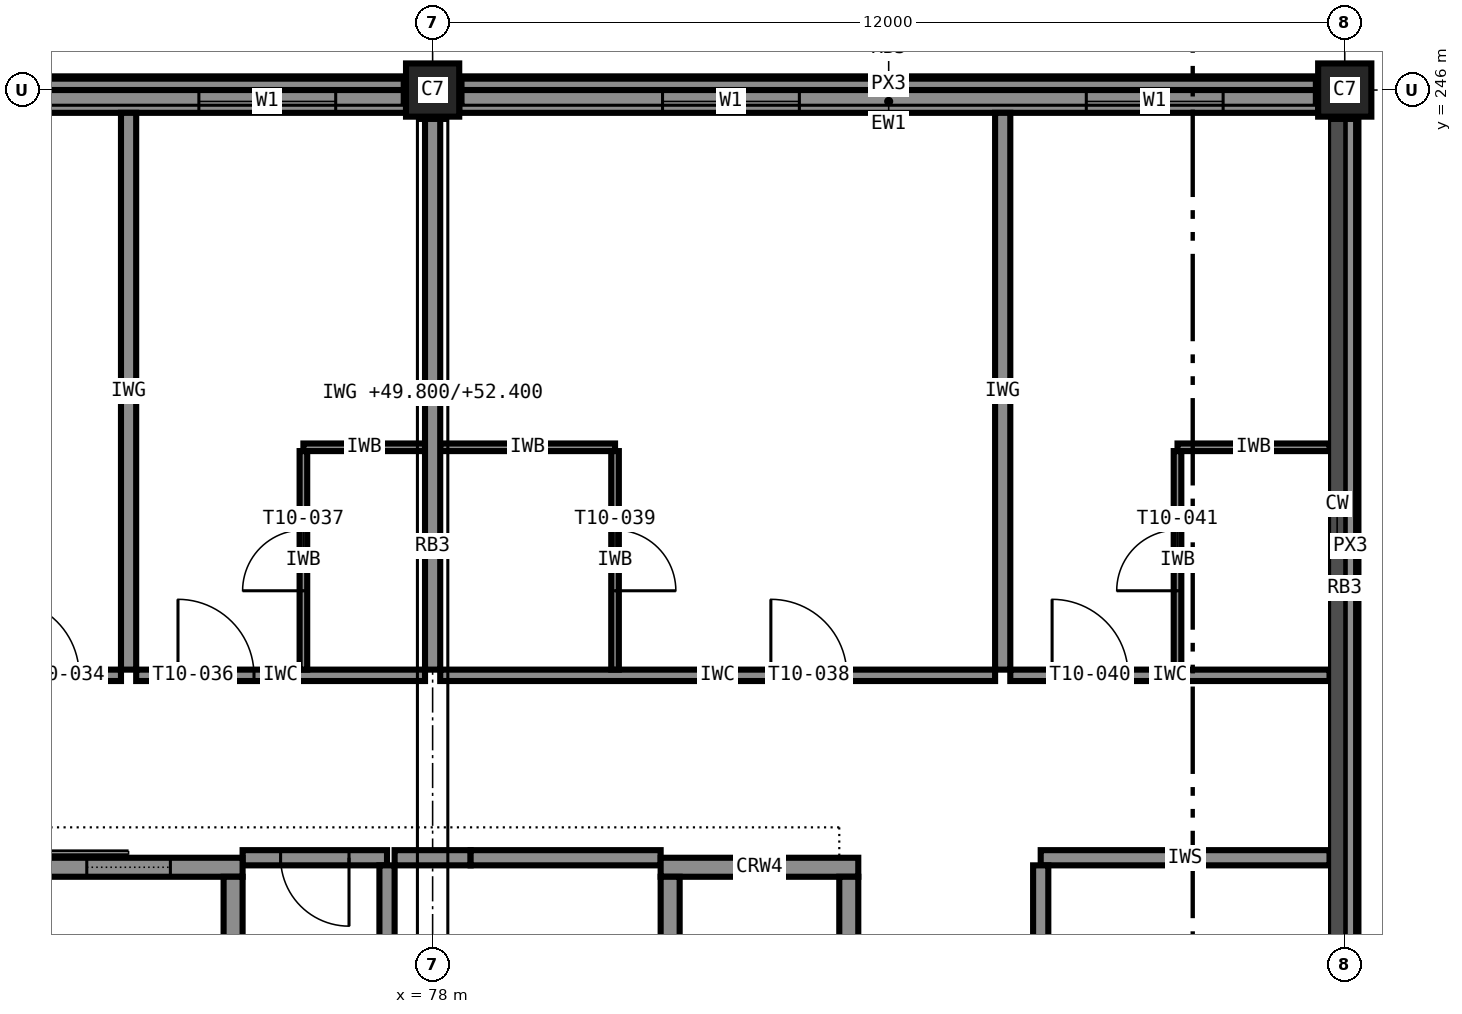
"""IFC4 building model, lengths in metres.
Left out: names, types, materials, properties, quantities, classifications, styles, units other than length and angle.
Written with IfcOpenShell. Run it as: python <this file> out.ifc"""

import sys

from ifc_helpers import new_model, si_unit, direction, frame, frame_2d, origin, origin_2d, place, context, subcontext, project, spatial, rectangle, extrude, element, fill, save


model = new_model("IFC4")
c1 = context("Model", 3, precision=1e-05, world=origin(), true_north=direction((0.0, 1.0)))
c2 = subcontext(c1, "Body", "Model", "MODEL_VIEW")
j1 = project(units=[si_unit("LENGTHUNIT", "METRE"), si_unit("PLANEANGLEUNIT", "RADIAN")], contexts=[c1])
p1 = place(None, origin())
s1 = spatial("IfcSite", under=j1, at=p1, CompositionType="ELEMENT")
p2 = place(p1, origin())
s2 = spatial("IfcBuilding", under=s1, at=p2, CompositionType="ELEMENT")
p3 = place(p2, frame((0.0, 0.0, 49.8)))
s3 = spatial("IfcBuildingStorey", under=s2, at=p3, CompositionType="ELEMENT", Elevation=49.8)
for number, where, z_axis, x_axis in (
    (1, (78.0, 246.0, 0.0), (0.0, 0.0, 1.0), (1.0, 0.0, 0.0)),
    (2, (90.0, 246.0, 0.0), (0.0, 0.0, 1.0), (1.0, 0.0, 0.0)),
):
    element("IfcColumn", number, at=place(p3, frame(where, z_axis=z_axis, x_axis=x_axis)), inside=s3, PredefinedType="COLUMN", context=c2, shape_type="SweptSolid", body=[
        extrude(rectangle(XDim=0.7, YDim=0.7, at=origin_2d()), origin(), (0.0, 0.0, 1.0), 3.6),
    ])
p4 = place(p3, frame((72.5, 235.775, 0.0), z_axis=(0.0, 0.0, 1.0), x_axis=(1.0, 0.0, 0.0)))
e3 = element("IfcWall", 3, at=p4, inside=s3, PredefinedType="SHEAR", context=c2, shape_type="SweptSolid", body=[
    extrude(rectangle(XDim=3.0, YDim=0.25, at=frame_2d((1.5, 0.0))), origin(), (0.0, 0.0, 1.0), 3.6),
])
p5 = place(p4, frame((0.95, 0.0, 0.0)))
e4 = element("IfcOpeningElement", 4, at=p5, cuts=e3, PredefinedType="OPENING", context=c2, shape_type="SweptSolid", body=[
    extrude(rectangle(XDim=1.1, YDim=2.1, at=frame_2d((0.55, 1.05))), frame((0.0, 0.135, 0.0), z_axis=(0.0, -1.0, 0.0), x_axis=(1.0, 0.0, 0.0)), (0.0, 0.0, 1.0), 0.27),
])
p6 = place(p3, frame((75.375, 232.35, 0.0), z_axis=(0.0, 0.0, 1.0), x_axis=(0.0, 1.0, 0.0)))
e5 = element("IfcWall", 5, at=p6, inside=s3, PredefinedType="SHEAR", context=c2, shape_type="SweptSolid", body=[
    extrude(rectangle(XDim=3.3, YDim=0.25, at=frame_2d((1.65, 0.0))), origin(), (0.0, 0.0, 1.0), 3.6),
])
p7 = place(p3, frame((81.0, 235.775, 0.0), z_axis=(0.0, 0.0, 1.0), x_axis=(1.0, 0.0, 0.0)))
e6 = element("IfcWall", 6, at=p7, inside=s3, PredefinedType="SHEAR", context=c2, shape_type="SweptSolid", body=[
    extrude(rectangle(XDim=2.6, YDim=0.25, at=frame_2d((1.3, 0.0))), origin(), (0.0, 0.0, 1.0), 3.6),
])
p8 = place(p3, frame((81.125, 232.35, 0.0), z_axis=(0.0, 0.0, 1.0), x_axis=(0.0, 1.0, 0.0)))
e7 = element("IfcWall", 7, at=p8, inside=s3, PredefinedType="SHEAR", context=c2, shape_type="SweptSolid", body=[
    extrude(rectangle(XDim=3.3, YDim=0.25, at=frame_2d((1.65, 0.0))), origin(), (0.0, 0.0, 1.0), 3.6),
])
p9 = place(p8, frame((1.1, 0.0, 0.0)))
e8 = element("IfcOpeningElement", 8, at=p9, cuts=e7, PredefinedType="OPENING", context=c2, shape_type="SweptSolid", body=[
    extrude(rectangle(XDim=1.1, YDim=2.1, at=frame_2d((0.55, 1.05))), frame((0.0, 0.135, 0.0), z_axis=(0.0, -1.0, 0.0), x_axis=(1.0, 0.0, 0.0)), (0.0, 0.0, 1.0), 0.27),
])
p10 = place(p3, frame((83.475, 232.35, 0.0), z_axis=(0.0, 0.0, 1.0), x_axis=(0.0, 1.0, 0.0)))
e9 = element("IfcWall", 9, at=p10, inside=s3, PredefinedType="SHEAR", context=c2, shape_type="SweptSolid", body=[
    extrude(rectangle(XDim=3.3, YDim=0.25, at=frame_2d((1.65, 0.0))), origin(), (0.0, 0.0, 1.0), 3.6),
])
p11 = place(p3, frame((90.075, 234.35, 3.4), z_axis=(0.0, 0.0, 1.0), x_axis=(0.0, 1.0, 0.0)))
e10 = element("IfcWall", 10, at=p11, inside=s3, PredefinedType="STANDARD", context=c2, shape_type="SweptSolid", body=[
    extrude(rectangle(XDim=11.3, YDim=0.15, at=frame_2d((5.65, 0.0))), origin(), (0.0, 0.0, 1.0), 0.2),
])
p12 = place(p3, frame((89.65, 245.85, 0.0), z_axis=(0.0, 0.0, 1.0), x_axis=(-1.0, 0.0, 0.0)))
e11 = element("IfcWall", 11, at=p12, inside=s3, PredefinedType="STANDARD", context=c2, shape_type="SweptSolid", body=[
    extrude(rectangle(XDim=11.3, YDim=0.3, at=frame_2d((5.65, 0.0))), origin(), (0.0, 0.0, 1.0), 2.6),
])
p13 = place(p12, frame((6.825, 0.0, 0.85)))
e12 = element("IfcOpeningElement", 12, at=p13, cuts=e11, PredefinedType="OPENING", context=c2, shape_type="SweptSolid", body=[
    extrude(rectangle(XDim=1.8, YDim=1.75, at=frame_2d((0.9, 0.875))), frame((0.0, 0.16, 0.0), z_axis=(0.0, -1.0, 0.0), x_axis=(1.0, 0.0, 0.0)), (0.0, 0.0, 1.0), 0.32),
])
p14 = place(p12, frame((1.25, 0.0, 0.85)))
e13 = element("IfcOpeningElement", 13, at=p14, cuts=e11, PredefinedType="OPENING", context=c2, shape_type="SweptSolid", body=[
    extrude(rectangle(XDim=1.8, YDim=1.75, at=frame_2d((0.9, 0.875))), frame((0.0, 0.16, 0.0), z_axis=(0.0, -1.0, 0.0), x_axis=(1.0, 0.0, 0.0)), (0.0, 0.0, 1.0), 0.32),
])
p15 = place(p3, frame((77.65, 245.85, 0.0), z_axis=(0.0, 0.0, 1.0), x_axis=(-1.0, 0.0, 0.0)))
e14 = element("IfcWall", 14, at=p15, inside=s3, PredefinedType="STANDARD", context=c2, shape_type="SweptSolid", body=[
    extrude(rectangle(XDim=11.3, YDim=0.3, at=frame_2d((5.65, 0.0))), origin(), (0.0, 0.0, 1.0), 2.6),
])
p16 = place(p15, frame((8.575, 0.0, 0.85)))
e15 = element("IfcOpeningElement", 15, at=p16, cuts=e14, PredefinedType="OPENING", context=c2, shape_type="SweptSolid", body=[
    extrude(rectangle(XDim=1.8, YDim=1.75, at=frame_2d((0.9, 0.875))), frame((0.0, 0.16, 0.0), z_axis=(0.0, -1.0, 0.0), x_axis=(1.0, 0.0, 0.0)), (0.0, 0.0, 1.0), 0.32),
])
p17 = place(p15, frame((4.75, 0.0, 0.85)))
e16 = element("IfcOpeningElement", 16, at=p17, cuts=e14, PredefinedType="OPENING", context=c2, shape_type="SweptSolid", body=[
    extrude(rectangle(XDim=1.8, YDim=1.75, at=frame_2d((0.9, 0.875))), frame((0.0, 0.16, 0.0), z_axis=(0.0, -1.0, 0.0), x_axis=(1.0, 0.0, 0.0)), (0.0, 0.0, 1.0), 0.32),
])
p18 = place(p15, frame((0.925, 0.0, 0.85)))
e17 = element("IfcOpeningElement", 17, at=p18, cuts=e14, PredefinedType="OPENING", context=c2, shape_type="SweptSolid", body=[
    extrude(rectangle(XDim=1.8, YDim=1.75, at=frame_2d((0.9, 0.875))), frame((0.0, 0.16, 0.0), z_axis=(0.0, -1.0, 0.0), x_axis=(1.0, 0.0, 0.0)), (0.0, 0.0, 1.0), 0.32),
])
for number, where, z_axis, x_axis in (
    (18, (89.65, 246.075, 3.4), (0.0, 0.0, 1.0), (-1.0, 0.0, 0.0)),
    (19, (77.65, 246.075, 3.4), (0.0, 0.0, 1.0), (-1.0, 0.0, 0.0)),
):
    element("IfcWall", number, at=place(p3, frame(where, z_axis=z_axis, x_axis=x_axis)), inside=s3, PredefinedType="STANDARD", context=c2, shape_type="SweptSolid", body=[
        extrude(rectangle(XDim=11.3, YDim=0.15, at=frame_2d((5.65, 0.0))), origin(), (0.0, 0.0, 1.0), 0.2),
    ])
p19 = place(p3, frame((77.4, 235.9, 0.0), z_axis=(0.0, 0.0, 1.0), x_axis=(-1.0, 0.0, 0.0)))
e20 = element("IfcWall", 20, at=p19, inside=s3, PredefinedType="PARTITIONING", context=c2, shape_type="SweptSolid", body=[
    extrude(rectangle(XDim=1.9, YDim=0.2, at=frame_2d((0.95, 0.0))), origin(), (0.0, 0.0, 1.0), 3.4),
])
p20 = place(p19, frame((0.5, 0.0, 0.0)))
e21 = element("IfcOpeningElement", 21, at=p20, cuts=e20, PredefinedType="OPENING", context=c2, shape_type="SweptSolid", body=[
    extrude(rectangle(XDim=0.9, YDim=2.1, at=frame_2d((0.45, 1.05))), frame((0.0, 0.11, 0.0), z_axis=(0.0, -1.0, 0.0), x_axis=(1.0, 0.0, 0.0)), (0.0, 0.0, 1.0), 0.22),
])
p21 = place(p3, frame((77.5, 235.9, 0.0), z_axis=(0.0, 0.0, 1.0), x_axis=(1.0, 0.0, 0.0)))
e22 = element("IfcWall", 22, at=p21, inside=s3, PredefinedType="PARTITIONING", context=c2, shape_type="SweptSolid", body=[
    extrude(rectangle(XDim=1.0, YDim=0.2, at=frame_2d((0.5, 0.0))), origin(), (0.0, 0.0, 1.0), 3.4),
])
p22 = place(p3, frame((78.5, 235.9, 0.0), z_axis=(0.0, 0.0, 1.0), x_axis=(1.0, 0.0, 0.0)))
e23 = element("IfcWall", 23, at=p22, inside=s3, PredefinedType="PARTITIONING", context=c2, shape_type="SweptSolid", body=[
    extrude(rectangle(XDim=2.5, YDim=0.2, at=frame_2d((1.25, 0.0))), origin(), (0.0, 0.0, 1.0), 3.4),
])
p23 = place(p3, frame((86.0, 235.9, 0.0), z_axis=(0.0, 0.0, 1.0), x_axis=(1.0, 0.0, 0.0)))
e24 = element("IfcWall", 24, at=p23, inside=s3, PredefinedType="PARTITIONING", context=c2, shape_type="SweptSolid", body=[
    extrude(rectangle(XDim=3.8, YDim=0.2, at=frame_2d((1.9, 0.0))), origin(), (0.0, 0.0, 1.0), 3.4),
])
p24 = place(p3, frame((77.4, 232.2, 0.0), z_axis=(0.0, 0.0, 1.0), x_axis=(0.0, 1.0, 0.0)))
e25 = element("IfcWall", 25, at=p24, inside=s3, PredefinedType="PARTITIONING", context=c2, shape_type="SweptSolid", body=[
    extrude(rectangle(XDim=3.6, YDim=0.2, at=frame_2d((1.8, 0.0))), origin(), (0.0, 0.0, 1.0), 3.4),
])
p25 = place(p3, frame((86.0, 235.8, 0.0), z_axis=(0.0, 0.0, 1.0), x_axis=(0.0, -1.0, 0.0)))
e26 = element("IfcWall", 26, at=p25, inside=s3, PredefinedType="PARTITIONING", context=c2, shape_type="SweptSolid", body=[
    extrude(rectangle(XDim=3.6, YDim=0.2, at=frame_2d((1.8, 0.0))), origin(), (0.0, 0.0, 1.0), 3.4),
])
p26 = place(p25, frame((1.35, 0.0, 0.0)))
e27 = element("IfcOpeningElement", 27, at=p26, cuts=e26, PredefinedType="OPENING", context=c2, shape_type="SweptSolid", body=[
    extrude(rectangle(XDim=0.9, YDim=2.1, at=frame_2d((0.45, 1.05))), frame((0.0, 0.11, 0.0), z_axis=(0.0, -1.0, 0.0), x_axis=(1.0, 0.0, 0.0)), (0.0, 0.0, 1.0), 0.22),
])
p27 = place(p3, frame((70.1, 238.3, 0.0), z_axis=(0.0, 0.0, 1.0), x_axis=(1.0, 0.0, 0.0)))
e28 = element("IfcWall", 28, at=p27, inside=s3, PredefinedType="PARTITIONING", context=c2, shape_type="SweptSolid", body=[
    extrude(rectangle(XDim=3.8, YDim=0.15, at=frame_2d((1.9, 0.0))), origin(), (0.0, 0.0, 1.0), 3.4),
])
p28 = place(p27, frame((2.25, 0.0, 0.0)))
e29 = element("IfcOpeningElement", 29, at=p28, cuts=e28, PredefinedType="OPENING", context=c2, shape_type="SweptSolid", body=[
    extrude(rectangle(XDim=1.0, YDim=2.1, at=frame_2d((0.5, 1.05))), frame((0.0, 0.085, 0.0), z_axis=(0.0, -1.0, 0.0), x_axis=(1.0, 0.0, 0.0)), (0.0, 0.0, 1.0), 0.17),
])
p29 = place(p3, frame((74.1, 238.3, 0.0), z_axis=(0.0, 0.0, 1.0), x_axis=(1.0, 0.0, 0.0)))
e30 = element("IfcWall", 30, at=p29, inside=s3, PredefinedType="PARTITIONING", context=c2, shape_type="SweptSolid", body=[
    extrude(rectangle(XDim=3.8, YDim=0.15, at=frame_2d((1.9, 0.0))), origin(), (0.0, 0.0, 1.0), 3.4),
])
p30 = place(p29, frame((0.55, 0.0, 0.0)))
e31 = element("IfcOpeningElement", 31, at=p30, cuts=e30, PredefinedType="OPENING", context=c2, shape_type="SweptSolid", body=[
    extrude(rectangle(XDim=1.0, YDim=2.1, at=frame_2d((0.5, 1.05))), frame((0.0, 0.085, 0.0), z_axis=(0.0, -1.0, 0.0), x_axis=(1.0, 0.0, 0.0)), (0.0, 0.0, 1.0), 0.17),
])
p31 = place(p3, frame((76.3, 241.3, 0.0), z_axis=(0.0, 0.0, 1.0), x_axis=(1.0, 0.0, 0.0)))
e32 = element("IfcWall", 32, at=p31, inside=s3, PredefinedType="PARTITIONING", context=c2, shape_type="SweptSolid", body=[
    extrude(rectangle(XDim=1.6, YDim=0.1, at=frame_2d((0.8, 0.0))), origin(), (0.0, 0.0, 1.0), 3.4),
])
p32 = place(p3, frame((76.3, 238.375, 0.0), z_axis=(0.0, 0.0, 1.0), x_axis=(0.0, 1.0, 0.0)))
e33 = element("IfcWall", 33, at=p32, inside=s3, PredefinedType="PARTITIONING", context=c2, shape_type="SweptSolid", body=[
    extrude(rectangle(XDim=2.875, YDim=0.1, at=frame_2d((1.438, 0.0))), origin(), (0.0, 0.0, 1.0), 3.4),
])
p33 = place(p32, frame((1.038, 0.0, 0.0)))
e34 = element("IfcOpeningElement", 34, at=p33, cuts=e33, PredefinedType="OPENING", context=c2, shape_type="SweptSolid", body=[
    extrude(rectangle(XDim=0.8, YDim=2.1, at=frame_2d((0.4, 1.05))), frame((0.0, 0.06, 0.0), z_axis=(0.0, -1.0, 0.0), x_axis=(1.0, 0.0, 0.0)), (0.0, 0.0, 1.0), 0.12),
])
p34 = place(p3, frame((78.1, 238.3, 0.0), z_axis=(0.0, 0.0, 1.0), x_axis=(1.0, 0.0, 0.0)))
e35 = element("IfcWall", 35, at=p34, inside=s3, PredefinedType="PARTITIONING", context=c2, shape_type="SweptSolid", body=[
    extrude(rectangle(XDim=7.3, YDim=0.15, at=frame_2d((3.65, 0.0))), origin(), (0.0, 0.0, 1.0), 3.4),
])
p35 = place(p34, frame((4.35, 0.0, 0.0)))
e36 = element("IfcOpeningElement", 36, at=p35, cuts=e35, PredefinedType="OPENING", context=c2, shape_type="SweptSolid", body=[
    extrude(rectangle(XDim=1.0, YDim=2.1, at=frame_2d((0.5, 1.05))), frame((0.0, 0.085, 0.0), z_axis=(0.0, -1.0, 0.0), x_axis=(1.0, 0.0, 0.0)), (0.0, 0.0, 1.0), 0.17),
])
p36 = place(p3, frame((78.1, 241.3, 0.0), z_axis=(0.0, 0.0, 1.0), x_axis=(1.0, 0.0, 0.0)))
e37 = element("IfcWall", 37, at=p36, inside=s3, PredefinedType="PARTITIONING", context=c2, shape_type="SweptSolid", body=[
    extrude(rectangle(XDim=2.3, YDim=0.1, at=frame_2d((1.15, 0.0))), origin(), (0.0, 0.0, 1.0), 3.4),
])
p37 = place(p3, frame((80.4, 241.25, 0.0), z_axis=(0.0, 0.0, 1.0), x_axis=(0.0, -1.0, 0.0)))
e38 = element("IfcWall", 38, at=p37, inside=s3, PredefinedType="PARTITIONING", context=c2, shape_type="SweptSolid", body=[
    extrude(rectangle(XDim=2.875, YDim=0.1, at=frame_2d((1.438, 0.0))), origin(), (0.0, 0.0, 1.0), 3.4),
])
p38 = place(p37, frame((1.038, 0.0, 0.0)))
e39 = element("IfcOpeningElement", 39, at=p38, cuts=e38, PredefinedType="OPENING", context=c2, shape_type="SweptSolid", body=[
    extrude(rectangle(XDim=0.8, YDim=2.1, at=frame_2d((0.4, 1.05))), frame((0.0, 0.06, 0.0), z_axis=(0.0, -1.0, 0.0), x_axis=(1.0, 0.0, 0.0)), (0.0, 0.0, 1.0), 0.12),
])
p39 = place(p3, frame((85.6, 238.3, 0.0), z_axis=(0.0, 0.0, 1.0), x_axis=(1.0, 0.0, 0.0)))
e40 = element("IfcWall", 40, at=p39, inside=s3, PredefinedType="PARTITIONING", context=c2, shape_type="SweptSolid", body=[
    extrude(rectangle(XDim=4.2, YDim=0.15, at=frame_2d((2.1, 0.0))), origin(), (0.0, 0.0, 1.0), 3.4),
])
p40 = place(p39, frame((0.55, 0.0, 0.0)))
e41 = element("IfcOpeningElement", 41, at=p40, cuts=e40, PredefinedType="OPENING", context=c2, shape_type="SweptSolid", body=[
    extrude(rectangle(XDim=1.0, YDim=2.1, at=frame_2d((0.5, 1.05))), frame((0.0, 0.085, 0.0), z_axis=(0.0, -1.0, 0.0), x_axis=(1.0, 0.0, 0.0)), (0.0, 0.0, 1.0), 0.17),
])
p41 = place(p3, frame((87.8, 241.3, 0.0), z_axis=(0.0, 0.0, 1.0), x_axis=(1.0, 0.0, 0.0)))
e42 = element("IfcWall", 42, at=p41, inside=s3, PredefinedType="PARTITIONING", context=c2, shape_type="SweptSolid", body=[
    extrude(rectangle(XDim=2.0, YDim=0.1, at=frame_2d((1.0, 0.0))), origin(), (0.0, 0.0, 1.0), 3.4),
])
p42 = place(p3, frame((87.8, 238.375, 0.0), z_axis=(0.0, 0.0, 1.0), x_axis=(0.0, 1.0, 0.0)))
e43 = element("IfcWall", 43, at=p42, inside=s3, PredefinedType="PARTITIONING", context=c2, shape_type="SweptSolid", body=[
    extrude(rectangle(XDim=2.875, YDim=0.1, at=frame_2d((1.438, 0.0))), origin(), (0.0, 0.0, 1.0), 3.4),
])
p43 = place(p42, frame((1.038, 0.0, 0.0)))
e44 = element("IfcOpeningElement", 44, at=p43, cuts=e43, PredefinedType="OPENING", context=c2, shape_type="SweptSolid", body=[
    extrude(rectangle(XDim=0.8, YDim=2.1, at=frame_2d((0.4, 1.05))), frame((0.0, 0.06, 0.0), z_axis=(0.0, -1.0, 0.0), x_axis=(1.0, 0.0, 0.0)), (0.0, 0.0, 1.0), 0.12),
])
p44 = place(p3, frame((74.0, 245.7, 0.0), z_axis=(0.0, 0.0, 1.0), x_axis=(0.0, -1.0, 0.0)))
e45 = element("IfcWall", 45, at=p44, inside=s3, PredefinedType="PARTITIONING", context=c2, shape_type="SweptSolid", body=[
    extrude(rectangle(XDim=7.325, YDim=0.2, at=frame_2d((3.663, 0.0))), origin(), (0.0, 0.0, 1.0), 3.4),
])
p45 = place(p3, frame((78.0, 245.65, 0.0), z_axis=(0.0, 0.0, 1.0), x_axis=(0.0, -1.0, 0.0)))
e46 = element("IfcWall", 46, at=p45, inside=s3, PredefinedType="PARTITIONING", context=c2, shape_type="SweptSolid", body=[
    extrude(rectangle(XDim=7.275, YDim=0.2, at=frame_2d((3.637, 0.0))), origin(), (0.0, 0.0, 1.0), 2.6),
])
p46 = place(p3, frame((85.5, 245.7, 0.0), z_axis=(0.0, 0.0, 1.0), x_axis=(0.0, -1.0, 0.0)))
e47 = element("IfcWall", 47, at=p46, inside=s3, PredefinedType="PARTITIONING", context=c2, shape_type="SweptSolid", body=[
    extrude(rectangle(XDim=7.325, YDim=0.2, at=frame_2d((3.663, 0.0))), origin(), (0.0, 0.0, 1.0), 3.4),
])
p47 = place(p13, origin())
e48 = element("IfcWindow", 48, at=p47, inside=s3, PartitioningType="SINGLE_PANEL", PredefinedType="WINDOW", context=c2, shape_type="SweptSolid", body=[
    extrude(rectangle(XDim=1.8, YDim=1.75, at=frame_2d((0.9, 0.875))), frame((0.0, 0.03, 0.0), z_axis=(0.0, -1.0, 0.0), x_axis=(1.0, 0.0, 0.0)), (0.0, 0.0, 1.0), 0.06),
])
fill(e12, e48)
p48 = place(p14, origin())
e49 = element("IfcWindow", 49, at=p48, inside=s3, PartitioningType="SINGLE_PANEL", PredefinedType="WINDOW", context=c2, shape_type="SweptSolid", body=[
    extrude(rectangle(XDim=1.8, YDim=1.75, at=frame_2d((0.9, 0.875))), frame((0.0, 0.03, 0.0), z_axis=(0.0, -1.0, 0.0), x_axis=(1.0, 0.0, 0.0)), (0.0, 0.0, 1.0), 0.06),
])
fill(e13, e49)
p49 = place(p18, origin())
e50 = element("IfcWindow", 50, at=p49, inside=s3, PartitioningType="SINGLE_PANEL", PredefinedType="WINDOW", context=c2, shape_type="SweptSolid", body=[
    extrude(rectangle(XDim=1.8, YDim=1.75, at=frame_2d((0.9, 0.875))), frame((0.0, 0.03, 0.0), z_axis=(0.0, -1.0, 0.0), x_axis=(1.0, 0.0, 0.0)), (0.0, 0.0, 1.0), 0.06),
])
fill(e17, e50)
p50 = place(p20, origin())
e51 = element("IfcDoor", 51, at=p50, inside=s3, OperationType="SINGLE_SWING_LEFT", PredefinedType="DOOR", context=c2, shape_type="SweptSolid", body=[
    extrude(rectangle(XDim=0.9, YDim=2.1, at=frame_2d((0.45, 1.05))), frame((0.0, 0.025, 0.0), z_axis=(0.0, -1.0, 0.0), x_axis=(1.0, 0.0, 0.0)), (0.0, 0.0, 1.0), 0.05),
])
fill(e21, e51)
p51 = place(p28, origin())
e52 = element("IfcDoor", 52, at=p51, inside=s3, OperationType="SINGLE_SWING_LEFT", PredefinedType="DOOR", context=c2, shape_type="SweptSolid", body=[
    extrude(rectangle(XDim=1.0, YDim=2.1, at=frame_2d((0.5, 1.05))), frame((0.0, 0.025, 0.0), z_axis=(0.0, -1.0, 0.0), x_axis=(1.0, 0.0, 0.0)), (0.0, 0.0, 1.0), 0.05),
])
fill(e29, e52)
p52 = place(p30, origin())
e53 = element("IfcDoor", 53, at=p52, inside=s3, OperationType="SINGLE_SWING_LEFT", PredefinedType="DOOR", context=c2, shape_type="SweptSolid", body=[
    extrude(rectangle(XDim=1.0, YDim=2.1, at=frame_2d((0.5, 1.05))), frame((0.0, 0.025, 0.0), z_axis=(0.0, -1.0, 0.0), x_axis=(1.0, 0.0, 0.0)), (0.0, 0.0, 1.0), 0.05),
])
fill(e31, e53)
p53 = place(p33, origin())
e54 = element("IfcDoor", 54, at=p53, inside=s3, OperationType="SINGLE_SWING_LEFT", PredefinedType="DOOR", context=c2, shape_type="SweptSolid", body=[
    extrude(rectangle(XDim=0.8, YDim=2.1, at=frame_2d((0.4, 1.05))), frame((0.0, 0.025, 0.0), z_axis=(0.0, -1.0, 0.0), x_axis=(1.0, 0.0, 0.0)), (0.0, 0.0, 1.0), 0.05),
])
fill(e34, e54)
p54 = place(p35, origin())
e55 = element("IfcDoor", 55, at=p54, inside=s3, OperationType="SINGLE_SWING_LEFT", PredefinedType="DOOR", context=c2, shape_type="SweptSolid", body=[
    extrude(rectangle(XDim=1.0, YDim=2.1, at=frame_2d((0.5, 1.05))), frame((0.0, 0.025, 0.0), z_axis=(0.0, -1.0, 0.0), x_axis=(1.0, 0.0, 0.0)), (0.0, 0.0, 1.0), 0.05),
])
fill(e36, e55)
p55 = place(p38, origin())
e56 = element("IfcDoor", 56, at=p55, inside=s3, OperationType="SINGLE_SWING_RIGHT", PredefinedType="DOOR", context=c2, shape_type="SweptSolid", body=[
    extrude(rectangle(XDim=0.8, YDim=2.1, at=frame_2d((0.4, 1.05))), frame((0.0, 0.025, 0.0), z_axis=(0.0, -1.0, 0.0), x_axis=(1.0, 0.0, 0.0)), (0.0, 0.0, 1.0), 0.05),
])
fill(e39, e56)
p56 = place(p40, origin())
e57 = element("IfcDoor", 57, at=p56, inside=s3, OperationType="SINGLE_SWING_LEFT", PredefinedType="DOOR", context=c2, shape_type="SweptSolid", body=[
    extrude(rectangle(XDim=1.0, YDim=2.1, at=frame_2d((0.5, 1.05))), frame((0.0, 0.025, 0.0), z_axis=(0.0, -1.0, 0.0), x_axis=(1.0, 0.0, 0.0)), (0.0, 0.0, 1.0), 0.05),
])
fill(e41, e57)
p57 = place(p43, origin())
e58 = element("IfcDoor", 58, at=p57, inside=s3, OperationType="SINGLE_SWING_LEFT", PredefinedType="DOOR", context=c2, shape_type="SweptSolid", body=[
    extrude(rectangle(XDim=0.8, YDim=2.1, at=frame_2d((0.4, 1.05))), frame((0.0, 0.025, 0.0), z_axis=(0.0, -1.0, 0.0), x_axis=(1.0, 0.0, 0.0)), (0.0, 0.0, 1.0), 0.05),
])
fill(e44, e58)
p58 = place(p5, origin())
e59 = element("IfcDoor", 59, at=p58, inside=s3, OperationType="SLIDING_TO_LEFT", PredefinedType="DOOR", context=c2, shape_type="SweptSolid", body=[
    extrude(rectangle(XDim=1.1, YDim=2.1, at=frame_2d((0.55, 1.05))), frame((0.0, 0.025, 0.0), z_axis=(0.0, -1.0, 0.0), x_axis=(1.0, 0.0, 0.0)), (0.0, 0.0, 1.0), 0.05),
])
fill(e4, e59)
save(model, sys.argv[1])
